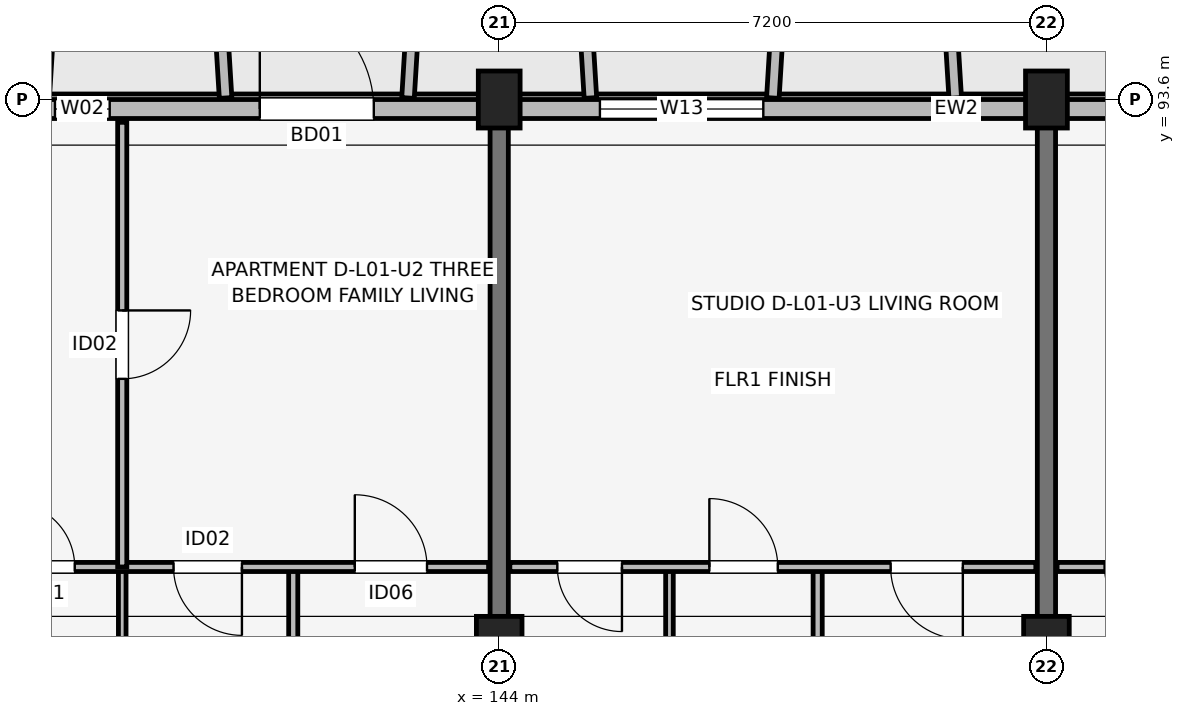
"""IFC4 building model, lengths in metres.
Left out: names, types, materials, properties, quantities, classifications, styles, units other than length and angle.
Written with IfcOpenShell. Run it as: python <this file> out.ifc"""

import sys

from ifc_helpers import new_model, si_unit, direction, frame, frame_2d, origin, origin_2d, place, context, subcontext, project, spatial, rectangle, extrude, element, fill, save


model = new_model("IFC4")
c1 = context("Model", 3, precision=1e-05, world=origin(), true_north=direction((0.0, 1.0)))
c2 = subcontext(c1, "Body", "Model", "MODEL_VIEW")
j1 = project(units=[si_unit("LENGTHUNIT", "METRE"), si_unit("PLANEANGLEUNIT", "RADIAN")], contexts=[c1])
p1 = place(None, origin())
s1 = spatial("IfcSite", under=j1, at=p1, CompositionType="ELEMENT")
p2 = place(p1, origin())
s2 = spatial("IfcBuilding", under=s1, at=p2, CompositionType="ELEMENT")
p3 = place(p2, frame((0.0, 0.0, 4.5)))
s3 = spatial("IfcBuildingStorey", under=s2, at=p3, CompositionType="ELEMENT", Elevation=4.5)
p4 = place(p3, frame((144.0, 86.4, 0.0), z_axis=(0.0, 0.0, 1.0), x_axis=(1.0, 0.0, 0.0)))
e1 = element("IfcColumn", 1, at=p4, inside=s3, PredefinedType="COLUMN", context=c2, shape_type="SweptSolid", body=[
    extrude(rectangle(XDim=0.6, YDim=0.8, at=origin_2d()), origin(), (0.0, 0.0, 1.0), 4.2),
])
p5 = place(p3, frame((144.0, 93.6, 0.0), z_axis=(0.0, 0.0, 1.0), x_axis=(1.0, 0.0, 0.0)))
e2 = element("IfcColumn", 2, at=p5, inside=s3, PredefinedType="COLUMN", context=c2, shape_type="SweptSolid", body=[
    extrude(rectangle(XDim=0.55, YDim=0.75, at=origin_2d()), origin(), (0.0, 0.0, 1.0), 4.2),
])
p6 = place(p3, frame((151.2, 86.4, 0.0), z_axis=(0.0, 0.0, 1.0), x_axis=(1.0, 0.0, 0.0)))
e3 = element("IfcColumn", 3, at=p6, inside=s3, PredefinedType="COLUMN", context=c2, shape_type="SweptSolid", body=[
    extrude(rectangle(XDim=0.6, YDim=0.8, at=origin_2d()), origin(), (0.0, 0.0, 1.0), 4.2),
])
p7 = place(p3, frame((151.2, 93.6, 0.0), z_axis=(0.0, 0.0, 1.0), x_axis=(1.0, 0.0, 0.0)))
e4 = element("IfcColumn", 4, at=p7, inside=s3, PredefinedType="COLUMN", context=c2, shape_type="SweptSolid", body=[
    extrude(rectangle(XDim=0.55, YDim=0.75, at=origin_2d()), origin(), (0.0, 0.0, 1.0), 4.2),
])
for number, where, z_axis, x_axis in (
    (5, (144.0, 83.85, 0.0), (0.0, 0.0, 1.0), (0.0, 1.0, 0.0)),
    (6, (151.2, 83.85, 0.0), (0.0, 0.0, 1.0), (0.0, 1.0, 0.0)),
):
    element("IfcWall", number, at=place(p3, frame(where, z_axis=z_axis, x_axis=x_axis)), inside=s3, PredefinedType="SHEAR", context=c2, shape_type="SweptSolid", body=[
        extrude(rectangle(XDim=9.4, YDim=0.24, at=frame_2d((4.7, 0.0))), origin(), (0.0, 0.0, 1.0), 4.2),
    ])
p8 = place(p3, frame((162.8, 93.475, 0.0), z_axis=(0.0, 0.0, 1.0), x_axis=(-1.0, 0.0, 0.0)))
e7 = element("IfcWall", 7, at=p8, inside=s3, PredefinedType="SOLIDWALL", context=c2, shape_type="SweptSolid", body=[
    extrude(rectangle(XDim=30.4, YDim=0.25, at=frame_2d((15.2, 0.0))), origin(), (0.0, 0.0, 1.0), 3.48),
])
p9 = place(p8, frame((21.95, 0.0, 0.0), z_axis=(0.0, 0.0, 1.0), x_axis=(-1.0, 0.0, 0.0)))
e8 = element("IfcOpeningElement", 8, at=p9, cuts=e7, PredefinedType="OPENING", context=c2, shape_type="SweptSolid", body=[
    extrude(rectangle(XDim=1.5, YDim=2.15, at=frame_2d((0.75, 1.075))), frame((0.0, 0.135, 0.0), z_axis=(0.0, -1.0, 0.0), x_axis=(1.0, 0.0, 0.0)), (0.0, 0.0, 1.0), 0.27),
])
p10 = place(p8, frame((7.7, 0.0, 0.0), z_axis=(0.0, 0.0, 1.0), x_axis=(-1.0, 0.0, 0.0)))
e9 = element("IfcOpeningElement", 9, at=p10, cuts=e7, PredefinedType="OPENING", context=c2, shape_type="SweptSolid", body=[
    extrude(rectangle(XDim=1.8, YDim=2.15, at=frame_2d((0.9, 1.075))), frame((0.0, 0.135, 0.0), z_axis=(0.0, -1.0, 0.0), x_axis=(1.0, 0.0, 0.0)), (0.0, 0.0, 1.0), 0.27),
])
p11 = place(p8, frame((27.765, 0.0, 0.75)))
e10 = element("IfcOpeningElement", 10, at=p11, cuts=e7, PredefinedType="OPENING", context=c2, shape_type="SweptSolid", body=[
    extrude(rectangle(XDim=1.1, YDim=1.5, at=frame_2d((0.55, 0.75))), frame((0.0, 0.135, 0.0), z_axis=(0.0, -1.0, 0.0), x_axis=(1.0, 0.0, 0.0)), (0.0, 0.0, 1.0), 0.27),
])
p12 = place(p8, frame((23.925, 0.0, 0.75)))
e11 = element("IfcOpeningElement", 11, at=p12, cuts=e7, PredefinedType="OPENING", context=c2, shape_type="SweptSolid", body=[
    extrude(rectangle(XDim=0.72, YDim=1.35, at=frame_2d((0.36, 0.675))), frame((0.0, 0.135, 0.0), z_axis=(0.0, -1.0, 0.0), x_axis=(1.0, 0.0, 0.0)), (0.0, 0.0, 1.0), 0.27),
])
p13 = place(p8, frame((15.325, 0.0, 0.7)))
e12 = element("IfcOpeningElement", 12, at=p13, cuts=e7, PredefinedType="OPENING", context=c2, shape_type="SweptSolid", body=[
    extrude(rectangle(XDim=2.15, YDim=1.65, at=frame_2d((1.075, 0.825))), frame((0.0, 0.135, 0.0), z_axis=(0.0, -1.0, 0.0), x_axis=(1.0, 0.0, 0.0)), (0.0, 0.0, 1.0), 0.27),
])
p14 = place(p8, frame((9.525, 0.0, 0.75)))
e13 = element("IfcOpeningElement", 13, at=p14, cuts=e7, PredefinedType="OPENING", context=c2, shape_type="SweptSolid", body=[
    extrude(rectangle(XDim=0.72, YDim=1.35, at=frame_2d((0.36, 0.675))), frame((0.0, 0.135, 0.0), z_axis=(0.0, -1.0, 0.0), x_axis=(1.0, 0.0, 0.0)), (0.0, 0.0, 1.0), 0.27),
])
p15 = place(p8, frame((1.04, 0.0, 0.7)))
e14 = element("IfcOpeningElement", 14, at=p15, cuts=e7, PredefinedType="OPENING", context=c2, shape_type="SweptSolid", body=[
    extrude(rectangle(XDim=1.92, YDim=1.72, at=frame_2d((0.96, 0.86))), frame((0.0, 0.135, 0.0), z_axis=(0.0, -1.0, 0.0), x_axis=(1.0, 0.0, 0.0)), (0.0, 0.0, 1.0), 0.27),
])
for number, where, z_axis, x_axis in (
    (15, (138.0, 93.62, 0.0), (0.0, 0.0, 1.0), (0.061, 0.998, 0.0)),
    (16, (140.4, 93.62, 0.0), (0.0, 0.0, 1.0), (-0.061, 0.998, 0.0)),
    (17, (142.8, 93.62, 0.0), (0.0, 0.0, 1.0), (0.061, 0.998, 0.0)),
):
    element("IfcWall", number, at=place(p3, frame(where, z_axis=z_axis, x_axis=x_axis)), inside=s3, PredefinedType="ELEMENTEDWALL", context=c2, shape_type="SweptSolid", body=[
        extrude(rectangle(XDim=1.964, YDim=0.165, at=frame_2d((0.982, 0.0))), origin(), (0.0, 0.0, 1.0), 3.5),
    ])
for number, where, z_axis, x_axis in (
    (18, (145.2, 93.62, 0.0), (0.0, 0.0, 1.0), (-0.061, 0.998, 0.0)),
    (19, (147.6, 93.62, 0.0), (0.0, 0.0, 1.0), (0.061, 0.998, 0.0)),
    (20, (150.0, 93.62, 0.0), (0.0, 0.0, 1.0), (-0.061, 0.998, 0.0)),
):
    element("IfcWall", number, at=place(p3, frame(where, z_axis=z_axis, x_axis=x_axis)), inside=s3, PredefinedType="ELEMENTEDWALL", context=c2, shape_type="SweptSolid", body=[
        extrude(rectangle(XDim=1.964, YDim=0.165, at=frame_2d((0.982, 0.0))), origin(), (0.0, 0.0, 1.0), 3.53),
    ])
p16 = place(p3, frame((139.04, 83.7, 0.0), z_axis=(0.0, 0.0, 1.0), x_axis=(0.0, 1.0, 0.0)))
e21 = element("IfcWall", 21, at=p16, inside=s3, PredefinedType="PARTITIONING", context=c2, shape_type="SweptSolid", body=[
    extrude(rectangle(XDim=3.75, YDim=0.1, at=frame_2d((1.875, 0.0))), origin(), (0.0, 0.0, 1.0), 3.25),
])
p17 = place(p3, frame((141.29, 83.7, 0.0), z_axis=(0.0, 0.0, 1.0), x_axis=(0.0, 1.0, 0.0)))
e22 = element("IfcWall", 22, at=p17, inside=s3, PredefinedType="PARTITIONING", context=c2, shape_type="SweptSolid", body=[
    extrude(rectangle(XDim=3.75, YDim=0.12, at=frame_2d((1.875, 0.0))), origin(), (0.0, 0.0, 1.0), 3.25),
])
p18 = place(p3, frame((136.94, 87.45, 0.0), z_axis=(0.0, 0.0, 1.0), x_axis=(1.0, 0.0, 0.0)))
e23 = element("IfcWall", 23, at=p18, inside=s3, PredefinedType="PARTITIONING", context=c2, shape_type="SweptSolid", body=[
    extrude(rectangle(XDim=6.92, YDim=0.12, at=frame_2d((3.46, 0.0))), origin(), (0.0, 0.0, 1.0), 3.25),
])
p19 = place(p18, frame((0.625, 0.0, 0.0)))
e24 = element("IfcOpeningElement", 24, at=p19, cuts=e23, PredefinedType="OPENING", context=c2, shape_type="SweptSolid", body=[
    extrude(rectangle(XDim=0.85, YDim=2.08, at=frame_2d((0.425, 1.04))), frame((0.0, 0.07, 0.0), z_axis=(0.0, -1.0, 0.0), x_axis=(1.0, 0.0, 0.0)), (0.0, 0.0, 1.0), 0.14),
])
p20 = place(p18, frame((3.675, 0.0, 0.0), z_axis=(0.0, 0.0, 1.0), x_axis=(-1.0, 0.0, 0.0)))
e25 = element("IfcOpeningElement", 25, at=p20, cuts=e23, PredefinedType="OPENING", context=c2, shape_type="SweptSolid", body=[
    extrude(rectangle(XDim=0.9, YDim=2.08, at=frame_2d((0.45, 1.04))), frame((0.0, 0.07, 0.0), z_axis=(0.0, -1.0, 0.0), x_axis=(1.0, 0.0, 0.0)), (0.0, 0.0, 1.0), 0.14),
])
p21 = place(p18, frame((5.16, 0.0, 0.0)))
e26 = element("IfcOpeningElement", 26, at=p21, cuts=e23, PredefinedType="OPENING", context=c2, shape_type="SweptSolid", body=[
    extrude(rectangle(XDim=0.95, YDim=2.08, at=frame_2d((0.475, 1.04))), frame((0.0, 0.07, 0.0), z_axis=(0.0, -1.0, 0.0), x_axis=(1.0, 0.0, 0.0)), (0.0, 0.0, 1.0), 0.14),
])
p22 = place(p3, frame((139.04, 87.45, 0.0), z_axis=(0.0, 0.0, 1.0), x_axis=(0.0, 1.0, 0.0)))
e27 = element("IfcWall", 27, at=p22, inside=s3, PredefinedType="PARTITIONING", context=c2, shape_type="SweptSolid", body=[
    extrude(rectangle(XDim=5.85, YDim=0.12, at=frame_2d((2.925, 0.0))), origin(), (0.0, 0.0, 1.0), 3.25),
])
p23 = place(p22, frame((3.375, 0.0, 0.0), z_axis=(0.0, 0.0, 1.0), x_axis=(-1.0, 0.0, 0.0)))
e28 = element("IfcOpeningElement", 28, at=p23, cuts=e27, PredefinedType="OPENING", context=c2, shape_type="SweptSolid", body=[
    extrude(rectangle(XDim=0.9, YDim=2.08, at=frame_2d((0.45, 1.04))), frame((0.0, 0.07, 0.0), z_axis=(0.0, -1.0, 0.0), x_axis=(1.0, 0.0, 0.0)), (0.0, 0.0, 1.0), 0.14),
])
p24 = place(p3, frame((146.24, 83.7, 0.0), z_axis=(0.0, 0.0, 1.0), x_axis=(0.0, 1.0, 0.0)))
e29 = element("IfcWall", 29, at=p24, inside=s3, PredefinedType="PARTITIONING", context=c2, shape_type="SweptSolid", body=[
    extrude(rectangle(XDim=3.75, YDim=0.1, at=frame_2d((1.875, 0.0))), origin(), (0.0, 0.0, 1.0), 3.25),
])
p25 = place(p3, frame((148.19, 83.7, 0.0), z_axis=(0.0, 0.0, 1.0), x_axis=(0.0, 1.0, 0.0)))
e30 = element("IfcWall", 30, at=p25, inside=s3, PredefinedType="PARTITIONING", context=c2, shape_type="SweptSolid", body=[
    extrude(rectangle(XDim=3.75, YDim=0.12, at=frame_2d((1.875, 0.0))), origin(), (0.0, 0.0, 1.0), 3.25),
])
p26 = place(p3, frame((144.14, 87.45, 0.0), z_axis=(0.0, 0.0, 1.0), x_axis=(1.0, 0.0, 0.0)))
e31 = element("IfcWall", 31, at=p26, inside=s3, PredefinedType="PARTITIONING", context=c2, shape_type="SweptSolid", body=[
    extrude(rectangle(XDim=6.92, YDim=0.12, at=frame_2d((3.46, 0.0))), origin(), (0.0, 0.0, 1.0), 3.25),
])
p27 = place(p26, frame((1.475, 0.0, 0.0), z_axis=(0.0, 0.0, 1.0), x_axis=(-1.0, 0.0, 0.0)))
e32 = element("IfcOpeningElement", 32, at=p27, cuts=e31, PredefinedType="OPENING", context=c2, shape_type="SweptSolid", body=[
    extrude(rectangle(XDim=0.85, YDim=2.08, at=frame_2d((0.425, 1.04))), frame((0.0, 0.07, 0.0), z_axis=(0.0, -1.0, 0.0), x_axis=(1.0, 0.0, 0.0)), (0.0, 0.0, 1.0), 0.14),
])
p28 = place(p26, frame((2.625, 0.0, 0.0)))
e33 = element("IfcOpeningElement", 33, at=p28, cuts=e31, PredefinedType="OPENING", context=c2, shape_type="SweptSolid", body=[
    extrude(rectangle(XDim=0.9, YDim=2.08, at=frame_2d((0.45, 1.04))), frame((0.0, 0.07, 0.0), z_axis=(0.0, -1.0, 0.0), x_axis=(1.0, 0.0, 0.0)), (0.0, 0.0, 1.0), 0.14),
])
p29 = place(p26, frame((5.96, 0.0, 0.0), z_axis=(0.0, 0.0, 1.0), x_axis=(-1.0, 0.0, 0.0)))
e34 = element("IfcOpeningElement", 34, at=p29, cuts=e31, PredefinedType="OPENING", context=c2, shape_type="SweptSolid", body=[
    extrude(rectangle(XDim=0.95, YDim=2.08, at=frame_2d((0.475, 1.04))), frame((0.0, 0.07, 0.0), z_axis=(0.0, -1.0, 0.0), x_axis=(1.0, 0.0, 0.0)), (0.0, 0.0, 1.0), 0.14),
])
p30 = place(p3, frame((151.34, 87.45, 0.0), z_axis=(0.0, 0.0, 1.0), x_axis=(1.0, 0.0, 0.0)))
e35 = element("IfcWall", 35, at=p30, inside=s3, PredefinedType="PARTITIONING", context=c2, shape_type="SweptSolid", body=[
    extrude(rectangle(XDim=6.92, YDim=0.12, at=frame_2d((3.46, 0.0))), origin(), (0.0, 0.0, 1.0), 3.25),
])
p31 = place(p30, frame((1.475, 0.0, 0.0), z_axis=(0.0, 0.0, 1.0), x_axis=(-1.0, 0.0, 0.0)))
e36 = element("IfcOpeningElement", 36, at=p31, cuts=e35, PredefinedType="OPENING", context=c2, shape_type="SweptSolid", body=[
    extrude(rectangle(XDim=0.85, YDim=2.08, at=frame_2d((0.425, 1.04))), frame((0.0, 0.07, 0.0), z_axis=(0.0, -1.0, 0.0), x_axis=(1.0, 0.0, 0.0)), (0.0, 0.0, 1.0), 0.14),
])
p32 = place(p30, frame((2.775, 0.0, 0.0)))
e37 = element("IfcOpeningElement", 37, at=p32, cuts=e35, PredefinedType="OPENING", context=c2, shape_type="SweptSolid", body=[
    extrude(rectangle(XDim=0.9, YDim=2.08, at=frame_2d((0.45, 1.04))), frame((0.0, 0.07, 0.0), z_axis=(0.0, -1.0, 0.0), x_axis=(1.0, 0.0, 0.0)), (0.0, 0.0, 1.0), 0.14),
])
p33 = place(p30, frame((6.11, 0.0, 0.0), z_axis=(0.0, 0.0, 1.0), x_axis=(-1.0, 0.0, 0.0)))
e38 = element("IfcOpeningElement", 38, at=p33, cuts=e35, PredefinedType="OPENING", context=c2, shape_type="SweptSolid", body=[
    extrude(rectangle(XDim=0.95, YDim=2.08, at=frame_2d((0.475, 1.04))), frame((0.0, 0.07, 0.0), z_axis=(0.0, -1.0, 0.0), x_axis=(1.0, 0.0, 0.0)), (0.0, 0.0, 1.0), 0.14),
])
p34 = place(p9, origin())
e39 = element("IfcDoor", 39, at=p34, inside=s3, OperationType="SINGLE_SWING_RIGHT", PredefinedType="DOOR", context=c2, shape_type="SweptSolid", body=[
    extrude(rectangle(XDim=1.5, YDim=2.15, at=frame_2d((0.75, 1.075))), frame((0.0, 0.025, 0.0), z_axis=(0.0, -1.0, 0.0), x_axis=(1.0, 0.0, 0.0)), (0.0, 0.0, 1.0), 0.05),
])
fill(e8, e39)
p35 = place(p12, origin())
e40 = element("IfcWindow", 40, at=p35, inside=s3, PartitioningType="SINGLE_PANEL", PredefinedType="WINDOW", context=c2, shape_type="SweptSolid", body=[
    extrude(rectangle(XDim=0.72, YDim=1.35, at=frame_2d((0.36, 0.675))), frame((0.0, 0.03, 0.0), z_axis=(0.0, -1.0, 0.0), x_axis=(1.0, 0.0, 0.0)), (0.0, 0.0, 1.0), 0.06),
])
fill(e11, e40)
p36 = place(p13, origin())
e41 = element("IfcWindow", 41, at=p36, inside=s3, PartitioningType="SINGLE_PANEL", PredefinedType="WINDOW", context=c2, shape_type="SweptSolid", body=[
    extrude(rectangle(XDim=2.15, YDim=1.65, at=frame_2d((1.075, 0.825))), frame((0.0, 0.03, 0.0), z_axis=(0.0, -1.0, 0.0), x_axis=(1.0, 0.0, 0.0)), (0.0, 0.0, 1.0), 0.06),
])
fill(e12, e41)
p37 = place(p19, origin())
e42 = element("IfcDoor", 42, at=p37, inside=s3, OperationType="SINGLE_SWING_LEFT", PredefinedType="DOOR", context=c2, shape_type="SweptSolid", body=[
    extrude(rectangle(XDim=0.85, YDim=2.08, at=frame_2d((0.425, 1.04))), frame((0.0, 0.025, 0.0), z_axis=(0.0, -1.0, 0.0), x_axis=(1.0, 0.0, 0.0)), (0.0, 0.0, 1.0), 0.05),
])
fill(e24, e42)
p38 = place(p20, origin())
e43 = element("IfcDoor", 43, at=p38, inside=s3, OperationType="SINGLE_SWING_RIGHT", PredefinedType="DOOR", context=c2, shape_type="SweptSolid", body=[
    extrude(rectangle(XDim=0.9, YDim=2.08, at=frame_2d((0.45, 1.04))), frame((0.0, 0.025, 0.0), z_axis=(0.0, -1.0, 0.0), x_axis=(1.0, 0.0, 0.0)), (0.0, 0.0, 1.0), 0.05),
])
fill(e25, e43)
p39 = place(p21, origin())
e44 = element("IfcDoor", 44, at=p39, inside=s3, OperationType="SINGLE_SWING_LEFT", PredefinedType="DOOR", context=c2, shape_type="SweptSolid", body=[
    extrude(rectangle(XDim=0.95, YDim=2.08, at=frame_2d((0.475, 1.04))), frame((0.0, 0.025, 0.0), z_axis=(0.0, -1.0, 0.0), x_axis=(1.0, 0.0, 0.0)), (0.0, 0.0, 1.0), 0.05),
])
fill(e26, e44)
p40 = place(p23, origin())
e45 = element("IfcDoor", 45, at=p40, inside=s3, OperationType="SINGLE_SWING_RIGHT", PredefinedType="DOOR", context=c2, shape_type="SweptSolid", body=[
    extrude(rectangle(XDim=0.9, YDim=2.08, at=frame_2d((0.45, 1.04))), frame((0.0, 0.025, 0.0), z_axis=(0.0, -1.0, 0.0), x_axis=(1.0, 0.0, 0.0)), (0.0, 0.0, 1.0), 0.05),
])
fill(e28, e45)
p41 = place(p27, origin())
e46 = element("IfcDoor", 46, at=p41, inside=s3, OperationType="SINGLE_SWING_RIGHT", PredefinedType="DOOR", context=c2, shape_type="SweptSolid", body=[
    extrude(rectangle(XDim=0.85, YDim=2.08, at=frame_2d((0.425, 1.04))), frame((0.0, 0.025, 0.0), z_axis=(0.0, -1.0, 0.0), x_axis=(1.0, 0.0, 0.0)), (0.0, 0.0, 1.0), 0.05),
])
fill(e32, e46)
p42 = place(p28, origin())
e47 = element("IfcDoor", 47, at=p42, inside=s3, OperationType="SINGLE_SWING_LEFT", PredefinedType="DOOR", context=c2, shape_type="SweptSolid", body=[
    extrude(rectangle(XDim=0.9, YDim=2.08, at=frame_2d((0.45, 1.04))), frame((0.0, 0.025, 0.0), z_axis=(0.0, -1.0, 0.0), x_axis=(1.0, 0.0, 0.0)), (0.0, 0.0, 1.0), 0.05),
])
fill(e33, e47)
p43 = place(p29, origin())
e48 = element("IfcDoor", 48, at=p43, inside=s3, OperationType="SINGLE_SWING_RIGHT", PredefinedType="DOOR", context=c2, shape_type="SweptSolid", body=[
    extrude(rectangle(XDim=0.95, YDim=2.08, at=frame_2d((0.475, 1.04))), frame((0.0, 0.025, 0.0), z_axis=(0.0, -1.0, 0.0), x_axis=(1.0, 0.0, 0.0)), (0.0, 0.0, 1.0), 0.05),
])
fill(e34, e48)
p44 = place(p31, origin())
e49 = element("IfcDoor", 49, at=p44, inside=s3, OperationType="SINGLE_SWING_RIGHT", PredefinedType="DOOR", context=c2, shape_type="SweptSolid", body=[
    extrude(rectangle(XDim=0.85, YDim=2.08, at=frame_2d((0.425, 1.04))), frame((0.0, 0.025, 0.0), z_axis=(0.0, -1.0, 0.0), x_axis=(1.0, 0.0, 0.0)), (0.0, 0.0, 1.0), 0.05),
])
fill(e36, e49)
save(model, sys.argv[1])
